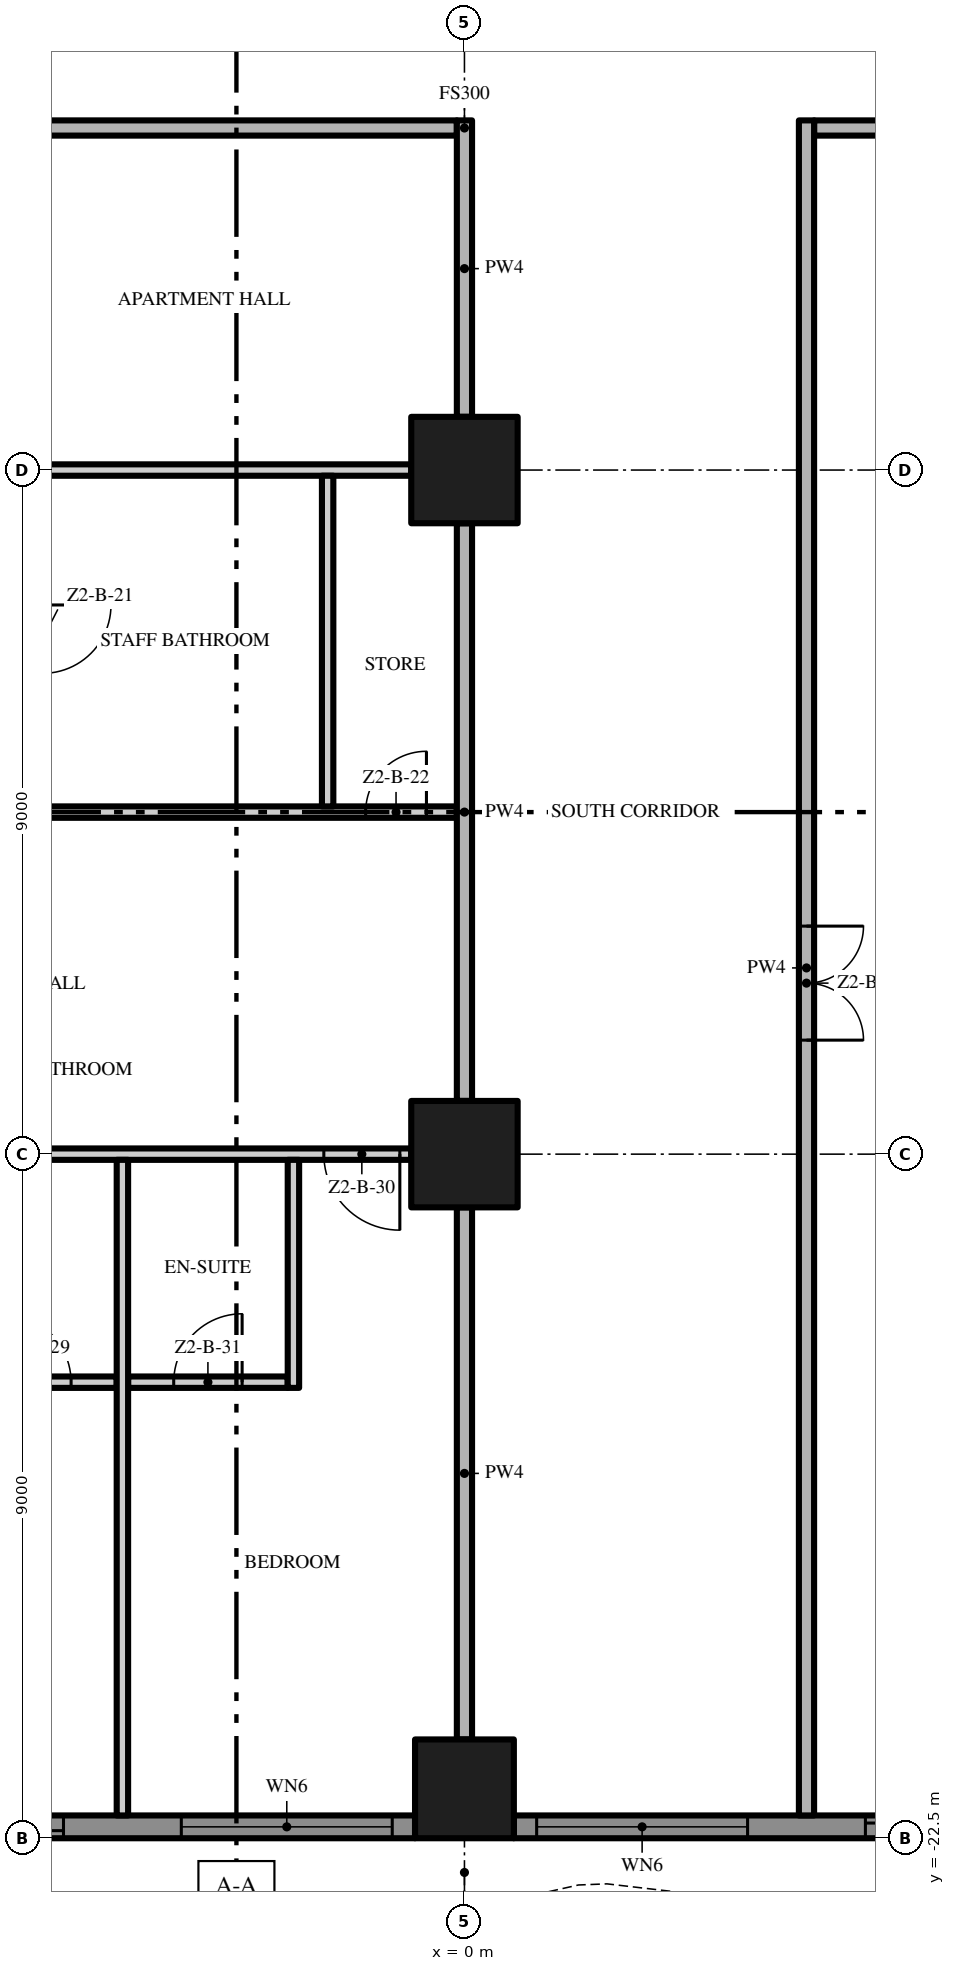
"""IFC4 building model, lengths in metres.
Left out: names, types, materials, properties, quantities, classifications, styles, units other than length and angle.
Written with IfcOpenShell. Run it as: python <this file> out.ifc"""

import sys

from ifc_helpers import new_model, si_unit, direction, frame, frame_2d, origin, origin_2d, place, context, subcontext, project, spatial, polyline, rectangle, outline, extrude, element, fill, save


model = new_model("IFC4")
c1 = context("Model", 3, precision=1e-05, world=origin(), true_north=direction((0.0, 1.0)))
c2 = subcontext(c1, "Body", "Model", "MODEL_VIEW")
j1 = project(units=[si_unit("LENGTHUNIT", "METRE"), si_unit("PLANEANGLEUNIT", "RADIAN")], contexts=[c1])
p1 = place(None, origin())
s1 = spatial("IfcSite", under=j1, at=p1, CompositionType="ELEMENT")
p2 = place(p1, origin())
s2 = spatial("IfcBuilding", under=s1, at=p2, CompositionType="ELEMENT")
p3 = place(p2, frame((0.0, 0.0, 80.8)))
s3 = spatial("IfcBuildingStorey", under=s2, at=p3, CompositionType="ELEMENT", Elevation=80.8)
p4 = place(p3, frame((0.0, -13.5, 0.0), z_axis=(0.0, 0.0, 1.0), x_axis=(1.0, 0.0, 0.0)))
e1 = element("IfcColumn", 1, at=p4, inside=s3, PredefinedType="COLUMN", context=c2, shape_type="SweptSolid", body=[
    extrude(rectangle(XDim=1.4, YDim=1.4, at=origin_2d()), origin(), (0.0, 0.0, 1.0), 3.5),
])
p5 = place(p3, frame((0.0, -21.85, 0.0), z_axis=(0.0, 0.0, 1.0), x_axis=(1.0, 0.0, 0.0)))
e2 = element("IfcColumn", 2, at=p5, inside=s3, PredefinedType="COLUMN", context=c2, shape_type="SweptSolid", body=[
    extrude(rectangle(XDim=1.3, YDim=1.3, at=origin_2d()), origin(), (0.0, 0.0, 1.0), 3.5),
])
p6 = place(p3, frame((0.0, -4.5, 0.0), z_axis=(0.0, 0.0, 1.0), x_axis=(1.0, 0.0, 0.0)))
e3 = element("IfcColumn", 3, at=p6, inside=s3, PredefinedType="COLUMN", context=c2, shape_type="SweptSolid", body=[
    extrude(rectangle(XDim=1.4, YDim=1.4, at=origin_2d()), origin(), (0.0, 0.0, 1.0), 3.5),
])
p7 = place(p3, frame((-0.65, -22.35, 0.0), z_axis=(0.0, 0.0, 1.0), x_axis=(-1.0, 0.0, 0.0)))
e4 = element("IfcWall", 4, at=p7, inside=s3, PredefinedType="SOLIDWALL", context=c2, shape_type="SweptSolid", body=[
    extrude(rectangle(XDim=7.7, YDim=0.3, at=frame_2d((3.85, 0.0))), origin(), (0.0, 0.0, 1.0), 3.5),
])
p8 = place(p7, frame((4.625, 0.0, 0.0)))
e5 = element("IfcOpeningElement", 5, at=p8, cuts=e4, PredefinedType="OPENING", context=c2, shape_type="SweptSolid", body=[
    extrude(rectangle(XDim=2.775, YDim=2.4, at=frame_2d((1.387, 1.2))), frame((0.0, 0.16, 0.0), z_axis=(0.0, -1.0, 0.0), x_axis=(1.0, 0.0, 0.0)), (0.0, 0.0, 1.0), 0.32),
])
p9 = place(p7, frame((0.3, 0.0, 0.45)))
e6 = element("IfcOpeningElement", 6, at=p9, cuts=e4, PredefinedType="OPENING", context=c2, shape_type="SweptSolid", body=[
    extrude(rectangle(XDim=2.775, YDim=2.65, at=frame_2d((1.387, 1.325))), frame((0.0, 0.16, 0.0), z_axis=(0.0, -1.0, 0.0), x_axis=(1.0, 0.0, 0.0)), (0.0, 0.0, 1.0), 0.32),
])
p10 = place(p3, frame((8.35, -22.35, 0.0), z_axis=(0.0, 0.0, 1.0), x_axis=(-1.0, 0.0, 0.0)))
e7 = element("IfcWall", 7, at=p10, inside=s3, PredefinedType="SOLIDWALL", context=c2, shape_type="SweptSolid", body=[
    extrude(rectangle(XDim=7.7, YDim=0.3, at=frame_2d((3.85, 0.0))), origin(), (0.0, 0.0, 1.0), 3.5),
])
p11 = place(p10, frame((4.625, 0.0, 0.45)))
e8 = element("IfcOpeningElement", 8, at=p11, cuts=e7, PredefinedType="OPENING", context=c2, shape_type="SweptSolid", body=[
    extrude(rectangle(XDim=2.775, YDim=2.65, at=frame_2d((1.387, 1.325))), frame((0.0, 0.16, 0.0), z_axis=(0.0, -1.0, 0.0), x_axis=(1.0, 0.0, 0.0)), (0.0, 0.0, 1.0), 0.32),
])
p12 = place(p10, frame((0.3, 0.0, 0.0)))
e9 = element("IfcOpeningElement", 9, at=p12, cuts=e7, PredefinedType="OPENING", context=c2, shape_type="SweptSolid", body=[
    extrude(rectangle(XDim=2.775, YDim=2.4, at=frame_2d((1.387, 1.2))), frame((0.0, 0.16, 0.0), z_axis=(0.0, -1.0, 0.0), x_axis=(1.0, 0.0, 0.0)), (0.0, 0.0, 1.0), 0.32),
])
p13 = place(p3, origin())
e10 = element("IfcWall", 10, at=p13, inside=s3, PredefinedType="USERDEFINED", context=c2, shape_type="SweptSolid", body=[
    extrude(outline(polyline([(-22.5, -25.149), (-21.0, -25.485), (-20.625, -25.5), (-19.5, -25.369), (-18.0, -24.845), (-16.5, -24.112), (-15.0, -23.451), (-13.5, -23.115), (-13.125, -23.1), (-12.0, -23.231), (-10.5, -23.755), (-9.0, -24.488), (-7.5, -25.149), (-6.0, -25.485), (-5.625, -25.5), (-4.5, -25.369), (-3.0, -24.845), (-1.5, -24.112), (0.0, -23.451), (1.5, -23.115), (1.875, -23.1), (3.0, -23.231), (4.5, -23.755), (6.0, -24.488), (7.5, -25.149), (9.0, -25.485), (9.375, -25.5), (10.5, -25.369), (12.0, -24.845), (13.5, -24.112), (15.0, -23.451), (16.5, -23.115), (16.875, -23.1), (18.0, -23.231), (19.5, -23.755), (21.0, -24.488), (22.5, -25.149), (22.601, -24.92), (21.105, -24.261), (19.596, -23.524), (18.056, -22.986), (16.885, -22.849), (16.467, -22.866), (14.921, -23.213), (13.395, -23.885), (11.904, -24.614), (10.444, -25.124), (9.365, -25.249), (9.033, -25.236), (7.579, -24.91), (6.105, -24.261), (4.596, -23.524), (3.056, -22.986), (1.885, -22.849), (1.467, -22.866), (-0.079, -23.213), (-1.605, -23.885), (-3.096, -24.614), (-4.556, -25.124), (-5.635, -25.249), (-5.967, -25.236), (-7.421, -24.91), (-8.895, -24.261), (-10.404, -23.524), (-11.944, -22.986), (-13.115, -22.849), (-13.533, -22.866), (-15.079, -23.213), (-16.605, -23.885), (-18.096, -24.614), (-19.556, -25.124), (-20.635, -25.249), (-20.967, -25.236), (-22.445, -24.905), (-22.5, -25.149)])), origin(), (0.0, 0.0, 1.0), 0.9),
])
p14 = place(p3, frame((-6.675, -16.5, 0.0), z_axis=(0.0, 0.0, 1.0), x_axis=(1.0, 0.0, 0.0)))
e11 = element("IfcWall", 11, at=p14, inside=s3, PredefinedType="PARTITIONING", context=c2, shape_type="SweptSolid", body=[
    extrude(rectangle(XDim=2.1, YDim=0.15, at=frame_2d((1.05, 0.0))), origin(), (0.0, 0.0, 1.0), 3.5),
])
p15 = place(p14, frame((0.6, 0.0, 0.0)))
e12 = element("IfcOpeningElement", 12, at=p15, cuts=e11, PredefinedType="OPENING", context=c2, shape_type="SweptSolid", body=[
    extrude(rectangle(XDim=0.9, YDim=2.1, at=frame_2d((0.45, 1.05))), frame((0.0, 0.085, 0.0), z_axis=(0.0, -1.0, 0.0), x_axis=(1.0, 0.0, 0.0)), (0.0, 0.0, 1.0), 0.17),
])
p16 = place(p3, frame((-4.425, -16.5, 0.0), z_axis=(0.0, 0.0, 1.0), x_axis=(1.0, 0.0, 0.0)))
e13 = element("IfcWall", 13, at=p16, inside=s3, PredefinedType="PARTITIONING", context=c2, shape_type="SweptSolid", body=[
    extrude(rectangle(XDim=2.1, YDim=0.15, at=frame_2d((1.05, 0.0))), origin(), (0.0, 0.0, 1.0), 3.5),
])
p17 = place(p16, frame((0.6, 0.0, 0.0)))
e14 = element("IfcOpeningElement", 14, at=p17, cuts=e13, PredefinedType="OPENING", context=c2, shape_type="SweptSolid", body=[
    extrude(rectangle(XDim=0.9, YDim=2.1, at=frame_2d((0.45, 1.05))), frame((0.0, 0.085, 0.0), z_axis=(0.0, -1.0, 0.0), x_axis=(1.0, 0.0, 0.0)), (0.0, 0.0, 1.0), 0.17),
])
p18 = place(p3, frame((-0.7, -13.5, 0.0), z_axis=(0.0, 0.0, 1.0), x_axis=(-1.0, 0.0, 0.0)))
e15 = element("IfcWall", 15, at=p18, inside=s3, PredefinedType="PARTITIONING", context=c2, shape_type="SweptSolid", body=[
    extrude(rectangle(XDim=7.6, YDim=0.15, at=frame_2d((3.8, 0.0))), origin(), (0.0, 0.0, 1.0), 3.5),
])
p19 = place(p18, frame((6.45, 0.0, 0.0)))
e16 = element("IfcOpeningElement", 16, at=p19, cuts=e15, PredefinedType="OPENING", context=c2, shape_type="SweptSolid", body=[
    extrude(rectangle(XDim=1.0, YDim=2.4, at=frame_2d((0.5, 1.2))), frame((0.0, 0.085, 0.0), z_axis=(0.0, -1.0, 0.0), x_axis=(1.0, 0.0, 0.0)), (0.0, 0.0, 1.0), 0.17),
])
p20 = place(p18, frame((0.15, 0.0, 0.0)))
e17 = element("IfcOpeningElement", 17, at=p20, cuts=e15, PredefinedType="OPENING", context=c2, shape_type="SweptSolid", body=[
    extrude(rectangle(XDim=1.0, YDim=2.4, at=frame_2d((0.5, 1.2))), frame((0.0, 0.085, 0.0), z_axis=(0.0, -1.0, 0.0), x_axis=(1.0, 0.0, 0.0)), (0.0, 0.0, 1.0), 0.17),
])
p21 = place(p3, frame((-10.725, -9.0, 0.0), z_axis=(0.0, 0.0, 1.0), x_axis=(1.0, 0.0, 0.0)))
e18 = element("IfcWall", 18, at=p21, inside=s3, PredefinedType="PARTITIONING", context=c2, shape_type="SweptSolid", body=[
    extrude(rectangle(XDim=10.625, YDim=0.15, at=frame_2d((5.312, 0.0))), origin(), (0.0, 0.0, 1.0), 3.5),
])
p22 = place(p21, frame((2.1, 0.0, 0.0)))
e19 = element("IfcOpeningElement", 19, at=p22, cuts=e18, PredefinedType="OPENING", context=c2, shape_type="SweptSolid", body=[
    extrude(rectangle(XDim=0.9, YDim=2.1, at=frame_2d((0.45, 1.05))), frame((0.0, 0.085, 0.0), z_axis=(0.0, -1.0, 0.0), x_axis=(1.0, 0.0, 0.0)), (0.0, 0.0, 1.0), 0.17),
])
p23 = place(p21, frame((9.425, 0.0, 0.0)))
e20 = element("IfcOpeningElement", 20, at=p23, cuts=e18, PredefinedType="OPENING", context=c2, shape_type="SweptSolid", body=[
    extrude(rectangle(XDim=0.8, YDim=2.0, at=frame_2d((0.4, 1.0))), frame((0.0, 0.085, 0.0), z_axis=(0.0, -1.0, 0.0), x_axis=(1.0, 0.0, 0.0)), (0.0, 0.0, 1.0), 0.17),
])
p24 = place(p3, frame((-8.3, -4.5, 0.0), z_axis=(0.0, 0.0, 1.0), x_axis=(1.0, 0.0, 0.0)))
e21 = element("IfcWall", 21, at=p24, inside=s3, PredefinedType="PARTITIONING", context=c2, shape_type="SweptSolid", body=[
    extrude(rectangle(XDim=7.6, YDim=0.15, at=frame_2d((3.8, 0.0))), origin(), (0.0, 0.0, 1.0), 3.5),
])
p25 = place(p3, frame((-0.1, 0.0, 0.0), z_axis=(0.0, 0.0, 1.0), x_axis=(-1.0, 0.0, 0.0)))
e22 = element("IfcWall", 22, at=p25, inside=s3, PredefinedType="PARTITIONING", context=c2, shape_type="SweptSolid", body=[
    extrude(rectangle(XDim=17.3, YDim=0.2, at=frame_2d((8.65, 0.0))), origin(), (0.0, 0.0, 1.0), 3.5),
])
p26 = place(p25, frame((8.15, 0.0, 0.0)))
e23 = element("IfcOpeningElement", 23, at=p26, cuts=e22, PredefinedType="OPENING", context=c2, shape_type="SweptSolid", body=[
    extrude(rectangle(XDim=1.5, YDim=2.4, at=frame_2d((0.75, 1.2))), frame((0.0, 0.11, 0.0), z_axis=(0.0, -1.0, 0.0), x_axis=(1.0, 0.0, 0.0)), (0.0, 0.0, 1.0), 0.22),
])
p27 = place(p3, frame((4.6, 0.0, 0.0), z_axis=(0.0, 0.0, 1.0), x_axis=(1.0, 0.0, 0.0)))
e24 = element("IfcWall", 24, at=p27, inside=s3, PredefinedType="PARTITIONING", context=c2, shape_type="SweptSolid", body=[
    extrude(rectangle(XDim=12.8, YDim=0.2, at=frame_2d((6.4, 0.0))), origin(), (0.0, 0.0, 1.0), 3.5),
])
p28 = place(p3, frame((-4.5, -22.2, 0.0), z_axis=(0.0, 0.0, 1.0), x_axis=(0.0, 1.0, 0.0)))
e25 = element("IfcWall", 25, at=p28, inside=s3, PredefinedType="PARTITIONING", context=c2, shape_type="SweptSolid", body=[
    extrude(rectangle(XDim=8.625, YDim=0.15, at=frame_2d((4.312, 0.0))), origin(), (0.0, 0.0, 1.0), 3.5),
])
p29 = place(p3, frame((-2.25, -16.575, 0.0), z_axis=(0.0, 0.0, 1.0), x_axis=(0.0, 1.0, 0.0)))
e26 = element("IfcWall", 26, at=p29, inside=s3, PredefinedType="PARTITIONING", context=c2, shape_type="SweptSolid", body=[
    extrude(rectangle(XDim=3.0, YDim=0.15, at=frame_2d((1.5, 0.0))), origin(), (0.0, 0.0, 1.0), 3.5),
])
p30 = place(p3, frame((-1.8, -8.925, 0.0), z_axis=(0.0, 0.0, 1.0), x_axis=(0.0, 1.0, 0.0)))
e27 = element("IfcWall", 27, at=p30, inside=s3, PredefinedType="PARTITIONING", context=c2, shape_type="SweptSolid", body=[
    extrude(rectangle(XDim=4.35, YDim=0.15, at=frame_2d((2.175, 0.0))), origin(), (0.0, 0.0, 1.0), 3.5),
])
p31 = place(p3, frame((0.0, -21.2, 0.0), z_axis=(0.0, 0.0, 1.0), x_axis=(0.0, 1.0, 0.0)))
e28 = element("IfcWall", 28, at=p31, inside=s3, PredefinedType="PARTITIONING", context=c2, shape_type="SweptSolid", body=[
    extrude(rectangle(XDim=7.0, YDim=0.2, at=frame_2d((3.5, 0.0))), origin(), (0.0, 0.0, 1.0), 3.5),
])
p32 = place(p3, frame((0.0, -12.8, 0.0), z_axis=(0.0, 0.0, 1.0), x_axis=(0.0, 1.0, 0.0)))
e29 = element("IfcWall", 29, at=p32, inside=s3, PredefinedType="PARTITIONING", context=c2, shape_type="SweptSolid", body=[
    extrude(rectangle(XDim=7.6, YDim=0.2, at=frame_2d((3.8, 0.0))), origin(), (0.0, 0.0, 1.0), 3.5),
])
p33 = place(p3, frame((0.0, -3.8, 0.0), z_axis=(0.0, 0.0, 1.0), x_axis=(0.0, 1.0, 0.0)))
e30 = element("IfcWall", 30, at=p33, inside=s3, PredefinedType="PARTITIONING", context=c2, shape_type="SweptSolid", body=[
    extrude(rectangle(XDim=3.9, YDim=0.2, at=frame_2d((1.95, 0.0))), origin(), (0.0, 0.0, 1.0), 3.5),
])
p34 = place(p3, frame((4.5, 0.1, 0.0), z_axis=(0.0, 0.0, 1.0), x_axis=(0.0, -1.0, 0.0)))
e31 = element("IfcWall", 31, at=p34, inside=s3, PredefinedType="PARTITIONING", context=c2, shape_type="SweptSolid", body=[
    extrude(rectangle(XDim=22.3, YDim=0.2, at=frame_2d((11.15, 0.0))), origin(), (0.0, 0.0, 1.0), 3.5),
])
p35 = place(p34, frame((10.6, 0.0, 0.0)))
e32 = element("IfcOpeningElement", 32, at=p35, cuts=e31, PredefinedType="OPENING", context=c2, shape_type="SweptSolid", body=[
    extrude(rectangle(XDim=1.5, YDim=2.4, at=frame_2d((0.75, 1.2))), frame((0.0, 0.11, 0.0), z_axis=(0.0, -1.0, 0.0), x_axis=(1.0, 0.0, 0.0)), (0.0, 0.0, 1.0), 0.22),
])
p36 = place(p8, origin())
e33 = element("IfcDoor", 33, at=p36, inside=s3, OperationType="SINGLE_SWING_LEFT", PredefinedType="DOOR", context=c2, shape_type="SweptSolid", body=[
    extrude(rectangle(XDim=2.775, YDim=2.4, at=frame_2d((1.387, 1.2))), frame((0.0, 0.025, 0.0), z_axis=(0.0, -1.0, 0.0), x_axis=(1.0, 0.0, 0.0)), (0.0, 0.0, 1.0), 0.05),
])
fill(e5, e33)
p37 = place(p9, origin())
e34 = element("IfcWindow", 34, at=p37, inside=s3, PartitioningType="SINGLE_PANEL", PredefinedType="WINDOW", context=c2, shape_type="SweptSolid", body=[
    extrude(rectangle(XDim=2.775, YDim=2.65, at=frame_2d((1.387, 1.325))), frame((0.0, 0.03, 0.0), z_axis=(0.0, -1.0, 0.0), x_axis=(1.0, 0.0, 0.0)), (0.0, 0.0, 1.0), 0.06),
])
fill(e6, e34)
p38 = place(p11, origin())
e35 = element("IfcWindow", 35, at=p38, inside=s3, PartitioningType="SINGLE_PANEL", PredefinedType="WINDOW", context=c2, shape_type="SweptSolid", body=[
    extrude(rectangle(XDim=2.775, YDim=2.65, at=frame_2d((1.387, 1.325))), frame((0.0, 0.03, 0.0), z_axis=(0.0, -1.0, 0.0), x_axis=(1.0, 0.0, 0.0)), (0.0, 0.0, 1.0), 0.06),
])
fill(e8, e35)
p39 = place(p12, origin())
e36 = element("IfcDoor", 36, at=p39, inside=s3, OperationType="SINGLE_SWING_LEFT", PredefinedType="DOOR", context=c2, shape_type="SweptSolid", body=[
    extrude(rectangle(XDim=2.775, YDim=2.4, at=frame_2d((1.387, 1.2))), frame((0.0, 0.025, 0.0), z_axis=(0.0, -1.0, 0.0), x_axis=(1.0, 0.0, 0.0)), (0.0, 0.0, 1.0), 0.05),
])
fill(e9, e36)
p40 = place(p23, origin())
e37 = element("IfcDoor", 37, at=p40, inside=s3, OperationType="SINGLE_SWING_RIGHT", PredefinedType="DOOR", context=c2, shape_type="SweptSolid", body=[
    extrude(rectangle(XDim=0.8, YDim=2.0, at=frame_2d((0.4, 1.0))), frame((0.0, 0.025, 0.0), z_axis=(0.0, -1.0, 0.0), x_axis=(1.0, 0.0, 0.0)), (0.0, 0.0, 1.0), 0.05),
])
fill(e20, e37)
p41 = place(p15, origin())
e38 = element("IfcDoor", 38, at=p41, inside=s3, OperationType="SINGLE_SWING_LEFT", PredefinedType="DOOR", context=c2, shape_type="SweptSolid", body=[
    extrude(rectangle(XDim=0.9, YDim=2.1, at=frame_2d((0.45, 1.05))), frame((0.0, 0.025, 0.0), z_axis=(0.0, -1.0, 0.0), x_axis=(1.0, 0.0, 0.0)), (0.0, 0.0, 1.0), 0.05),
])
fill(e12, e38)
p42 = place(p20, origin())
e39 = element("IfcDoor", 39, at=p42, inside=s3, OperationType="SINGLE_SWING_LEFT", PredefinedType="DOOR", context=c2, shape_type="SweptSolid", body=[
    extrude(rectangle(XDim=1.0, YDim=2.4, at=frame_2d((0.5, 1.2))), frame((0.0, 0.025, 0.0), z_axis=(0.0, -1.0, 0.0), x_axis=(1.0, 0.0, 0.0)), (0.0, 0.0, 1.0), 0.05),
])
fill(e17, e39)
p43 = place(p17, origin())
e40 = element("IfcDoor", 40, at=p43, inside=s3, OperationType="SINGLE_SWING_RIGHT", PredefinedType="DOOR", context=c2, shape_type="SweptSolid", body=[
    extrude(rectangle(XDim=0.9, YDim=2.1, at=frame_2d((0.45, 1.05))), frame((0.0, 0.025, 0.0), z_axis=(0.0, -1.0, 0.0), x_axis=(1.0, 0.0, 0.0)), (0.0, 0.0, 1.0), 0.05),
])
fill(e14, e40)
p44 = place(p35, origin())
e41 = element("IfcDoor", 41, at=p44, inside=s3, OperationType="DOUBLE_DOOR_SINGLE_SWING", PredefinedType="DOOR", context=c2, shape_type="SweptSolid", body=[
    extrude(rectangle(XDim=1.5, YDim=2.4, at=frame_2d((0.75, 1.2))), frame((0.0, 0.025, 0.0), z_axis=(0.0, -1.0, 0.0), x_axis=(1.0, 0.0, 0.0)), (0.0, 0.0, 1.0), 0.05),
])
fill(e32, e41)
save(model, sys.argv[1])
